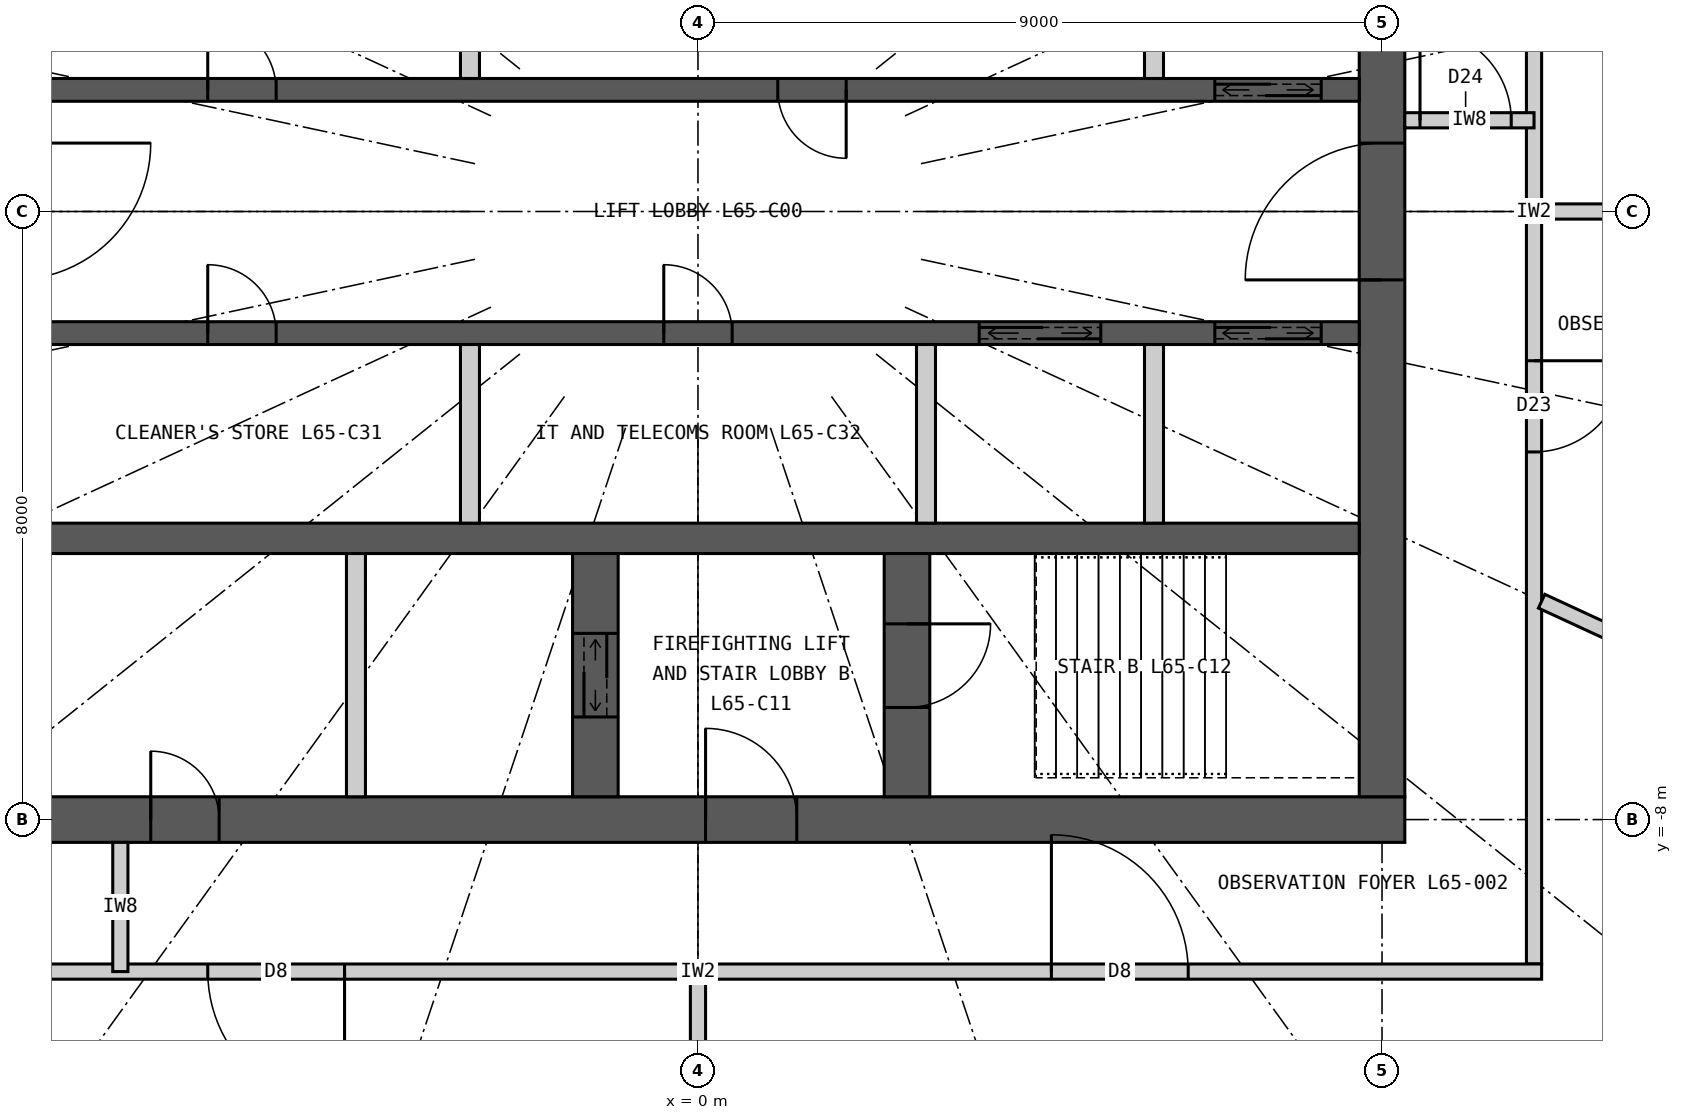
"""IFC4 building model, lengths in metres.
Left out: names, types, materials, properties, quantities, classifications, styles, units other than length and angle.
Written with IfcOpenShell. Run it as: python <this file> out.ifc"""

import sys

from ifc_helpers import new_model, si_unit, direction, frame, frame_2d, origin, place, context, subcontext, project, spatial, rectangle, extrude, element, fill, save


model = new_model("IFC4")
c1 = context("Model", 3, precision=1e-05, world=origin(), true_north=direction((0.0, 1.0)))
c2 = subcontext(c1, "Body", "Model", "MODEL_VIEW")
j1 = project(units=[si_unit("LENGTHUNIT", "METRE"), si_unit("PLANEANGLEUNIT", "RADIAN")], contexts=[c1])
p1 = place(None, origin())
s1 = spatial("IfcSite", under=j1, at=p1, CompositionType="ELEMENT")
p2 = place(p1, origin())
s2 = spatial("IfcBuilding", under=s1, at=p2, CompositionType="ELEMENT")
p3 = place(p2, frame((0.0, 0.0, 242.7)))
s3 = spatial("IfcBuildingStorey", under=s2, at=p3, CompositionType="ELEMENT", Elevation=242.7)
p4 = place(p3, frame((9.3, -8.0, 0.0), z_axis=(0.0, 0.0, 1.0), x_axis=(-1.0, 0.0, 0.0)))
e1 = element("IfcWall", 1, at=p4, inside=s3, PredefinedType="SHEAR", context=c2, shape_type="SweptSolid", body=[
    extrude(rectangle(XDim=18.6, YDim=0.6, at=frame_2d((9.3, 0.0))), origin(), (0.0, 0.0, 1.0), 6.0),
])
p5 = place(p4, frame((8.0, 0.0, 0.0)))
e2 = element("IfcOpeningElement", 2, at=p5, cuts=e1, PredefinedType="OPENING", context=c2, shape_type="SweptSolid", body=[
    extrude(rectangle(XDim=1.2, YDim=2.2, at=frame_2d((0.6, 1.1))), frame((0.0, 0.31, 0.0), z_axis=(0.0, -1.0, 0.0), x_axis=(1.0, 0.0, 0.0)), (0.0, 0.0, 1.0), 0.62),
])
p6 = place(p4, frame((15.6, 0.0, 0.0)))
e3 = element("IfcOpeningElement", 3, at=p6, cuts=e1, PredefinedType="OPENING", context=c2, shape_type="SweptSolid", body=[
    extrude(rectangle(XDim=0.9, YDim=2.2, at=frame_2d((0.45, 1.1))), frame((0.0, 0.31, 0.0), z_axis=(0.0, -1.0, 0.0), x_axis=(1.0, 0.0, 0.0)), (0.0, 0.0, 1.0), 0.62),
])
p7 = place(p3, frame((9.0, -7.7, 0.0), z_axis=(0.0, 0.0, 1.0), x_axis=(0.0, 1.0, 0.0)))
e4 = element("IfcWall", 4, at=p7, inside=s3, PredefinedType="SHEAR", context=c2, shape_type="SweptSolid", body=[
    extrude(rectangle(XDim=15.4, YDim=0.6, at=frame_2d((7.7, 0.0))), origin(), (0.0, 0.0, 1.0), 6.0),
])
p8 = place(p7, frame((6.8, 0.0, 0.0)))
e5 = element("IfcOpeningElement", 5, at=p8, cuts=e4, PredefinedType="OPENING", context=c2, shape_type="SweptSolid", body=[
    extrude(rectangle(XDim=1.8, YDim=2.2, at=frame_2d((0.9, 1.1))), frame((0.0, 0.31, 0.0), z_axis=(0.0, -1.0, 0.0), x_axis=(1.0, 0.0, 0.0)), (0.0, 0.0, 1.0), 0.62),
])
p9 = place(p3, frame((-8.7, 1.6, 0.0), z_axis=(0.0, 0.0, 1.0), x_axis=(1.0, 0.0, 0.0)))
e6 = element("IfcWall", 6, at=p9, inside=s3, PredefinedType="SHEAR", context=c2, shape_type="SweptSolid", body=[
    extrude(rectangle(XDim=17.4, YDim=0.3, at=frame_2d((8.7, 0.0))), origin(), (0.0, 0.0, 1.0), 6.0),
])
p10 = place(p9, frame((15.5, 0.0, 0.0)))
e7 = element("IfcOpeningElement", 7, at=p10, cuts=e6, PredefinedType="OPENING", context=c2, shape_type="SweptSolid", body=[
    extrude(rectangle(XDim=1.4, YDim=2.4, at=frame_2d((0.7, 1.2))), frame((0.0, 0.16, 0.0), z_axis=(0.0, -1.0, 0.0), x_axis=(1.0, 0.0, 0.0)), (0.0, 0.0, 1.0), 0.32),
])
p11 = place(p9, frame((2.25, 0.0, 0.0)))
e8 = element("IfcOpeningElement", 8, at=p11, cuts=e6, PredefinedType="OPENING", context=c2, shape_type="SweptSolid", body=[
    extrude(rectangle(XDim=0.9, YDim=2.2, at=frame_2d((0.45, 1.1))), frame((0.0, 0.16, 0.0), z_axis=(0.0, -1.0, 0.0), x_axis=(1.0, 0.0, 0.0)), (0.0, 0.0, 1.0), 0.32),
])
p12 = place(p9, frame((9.75, 0.0, 0.0)))
e9 = element("IfcOpeningElement", 9, at=p12, cuts=e6, PredefinedType="OPENING", context=c2, shape_type="SweptSolid", body=[
    extrude(rectangle(XDim=0.9, YDim=2.2, at=frame_2d((0.45, 1.1))), frame((0.0, 0.16, 0.0), z_axis=(0.0, -1.0, 0.0), x_axis=(1.0, 0.0, 0.0)), (0.0, 0.0, 1.0), 0.32),
])
p13 = place(p3, frame((-8.7, -4.3, 0.0), z_axis=(0.0, 0.0, 1.0), x_axis=(1.0, 0.0, 0.0)))
e10 = element("IfcWall", 10, at=p13, inside=s3, PredefinedType="SHEAR", context=c2, shape_type="SweptSolid", body=[
    extrude(rectangle(XDim=17.4, YDim=0.4, at=frame_2d((8.7, 0.0))), origin(), (0.0, 0.0, 1.0), 6.0),
])
p14 = place(p3, frame((-8.7, -1.6, 0.0), z_axis=(0.0, 0.0, 1.0), x_axis=(1.0, 0.0, 0.0)))
e11 = element("IfcWall", 11, at=p14, inside=s3, PredefinedType="SHEAR", context=c2, shape_type="SweptSolid", body=[
    extrude(rectangle(XDim=17.4, YDim=0.3, at=frame_2d((8.7, 0.0))), origin(), (0.0, 0.0, 1.0), 6.0),
])
p15 = place(p14, frame((12.4, 0.0, 0.0)))
e12 = element("IfcOpeningElement", 12, at=p15, cuts=e11, PredefinedType="OPENING", context=c2, shape_type="SweptSolid", body=[
    extrude(rectangle(XDim=1.6, YDim=2.4, at=frame_2d((0.8, 1.2))), frame((0.0, 0.16, 0.0), z_axis=(0.0, -1.0, 0.0), x_axis=(1.0, 0.0, 0.0)), (0.0, 0.0, 1.0), 0.32),
])
p16 = place(p14, frame((15.5, 0.0, 0.0)))
e13 = element("IfcOpeningElement", 13, at=p16, cuts=e11, PredefinedType="OPENING", context=c2, shape_type="SweptSolid", body=[
    extrude(rectangle(XDim=1.4, YDim=2.4, at=frame_2d((0.7, 1.2))), frame((0.0, 0.16, 0.0), z_axis=(0.0, -1.0, 0.0), x_axis=(1.0, 0.0, 0.0)), (0.0, 0.0, 1.0), 0.32),
])
p17 = place(p14, frame((2.25, 0.0, 0.0)))
e14 = element("IfcOpeningElement", 14, at=p17, cuts=e11, PredefinedType="OPENING", context=c2, shape_type="SweptSolid", body=[
    extrude(rectangle(XDim=0.9, YDim=2.2, at=frame_2d((0.45, 1.1))), frame((0.0, 0.16, 0.0), z_axis=(0.0, -1.0, 0.0), x_axis=(1.0, 0.0, 0.0)), (0.0, 0.0, 1.0), 0.32),
])
p18 = place(p14, frame((8.25, 0.0, 0.0)))
e15 = element("IfcOpeningElement", 15, at=p18, cuts=e11, PredefinedType="OPENING", context=c2, shape_type="SweptSolid", body=[
    extrude(rectangle(XDim=0.9, YDim=2.2, at=frame_2d((0.45, 1.1))), frame((0.0, 0.16, 0.0), z_axis=(0.0, -1.0, 0.0), x_axis=(1.0, 0.0, 0.0)), (0.0, 0.0, 1.0), 0.32),
])
p19 = place(p3, frame((2.75, -7.7, 0.0), z_axis=(0.0, 0.0, 1.0), x_axis=(0.0, 1.0, 0.0)))
e16 = element("IfcWall", 16, at=p19, inside=s3, PredefinedType="SHEAR", context=c2, shape_type="SweptSolid", body=[
    extrude(rectangle(XDim=3.2, YDim=0.6, at=frame_2d((1.6, 0.0))), origin(), (0.0, 0.0, 1.0), 6.0),
])
p20 = place(p19, frame((1.175, 0.0, 0.0)))
e17 = element("IfcOpeningElement", 17, at=p20, cuts=e16, PredefinedType="OPENING", context=c2, shape_type="SweptSolid", body=[
    extrude(rectangle(XDim=1.1, YDim=2.2, at=frame_2d((0.55, 1.1))), frame((0.0, 0.31, 0.0), z_axis=(0.0, -1.0, 0.0), x_axis=(1.0, 0.0, 0.0)), (0.0, 0.0, 1.0), 0.62),
])
p21 = place(p3, frame((-1.35, -7.7, 0.0), z_axis=(0.0, 0.0, 1.0), x_axis=(0.0, 1.0, 0.0)))
e18 = element("IfcWall", 18, at=p21, inside=s3, PredefinedType="SHEAR", context=c2, shape_type="SweptSolid", body=[
    extrude(rectangle(XDim=3.2, YDim=0.6, at=frame_2d((1.6, 0.0))), origin(), (0.0, 0.0, 1.0), 6.0),
])
p22 = place(p21, frame((1.05, 0.0, 0.0)))
e19 = element("IfcOpeningElement", 19, at=p22, cuts=e18, PredefinedType="OPENING", context=c2, shape_type="SweptSolid", body=[
    extrude(rectangle(XDim=1.1, YDim=2.2, at=frame_2d((0.55, 1.1))), frame((0.0, 0.31, 0.0), z_axis=(0.0, -1.0, 0.0), x_axis=(1.0, 0.0, 0.0)), (0.0, 0.0, 1.0), 0.62),
])
p23 = place(p3, frame((-4.5, -7.7, 0.0), z_axis=(0.0, 0.0, 1.0), x_axis=(0.0, 1.0, 0.0)))
e20 = element("IfcWall", 20, at=p23, inside=s3, PredefinedType="PARTITIONING", context=c2, shape_type="SweptSolid", body=[
    extrude(rectangle(XDim=3.2, YDim=0.25, at=frame_2d((1.6, 0.0))), origin(), (0.0, 0.0, 1.0), 6.0),
])
for number, where, z_axis, x_axis in (
    (21, (-3.0, 1.75, 0.0), (0.0, 0.0, 1.0), (0.0, 1.0, 0.0)),
    (22, (6.0, 1.75, 0.0), (0.0, 0.0, 1.0), (0.0, 1.0, 0.0)),
    (23, (-3.0, -4.1, 0.0), (0.0, 0.0, 1.0), (0.0, 1.0, 0.0)),
    (24, (3.0, -4.1, 0.0), (0.0, 0.0, 1.0), (0.0, 1.0, 0.0)),
    (25, (6.0, -4.1, 0.0), (0.0, 0.0, 1.0), (0.0, 1.0, 0.0)),
):
    element("IfcWall", number, at=place(p3, frame(where, z_axis=z_axis, x_axis=x_axis)), inside=s3, PredefinedType="PARTITIONING", context=c2, shape_type="SweptSolid", body=[
        extrude(rectangle(XDim=2.35, YDim=0.25, at=frame_2d((1.175, 0.0))), origin(), (0.0, 0.0, 1.0), 6.0),
    ])
p24 = place(p3, frame((9.346, -12.951, 0.0), z_axis=(0.0, 0.0, 1.0), x_axis=(0.858849230109, 0.512228464594, 0.0)))
e26 = element("IfcWall", 26, at=p24, inside=s3, PredefinedType="ELEMENTEDWALL", context=c2, shape_type="SweptSolid", body=[
    extrude(rectangle(XDim=4.564, YDim=0.15, at=frame_2d((2.282, 0.0))), origin(), (0.0, 0.0, 1.0), 5.7),
])
p25 = place(p24, frame((0.782, 0.0, 0.5)))
e27 = element("IfcOpeningElement", 27, at=p25, cuts=e26, PredefinedType="OPENING", context=c2, shape_type="SweptSolid", body=[
    extrude(rectangle(XDim=1.2, YDim=4.2, at=frame_2d((0.6, 2.1))), frame((0.0, 0.085, 0.0), z_axis=(0.0, -1.0, 0.0), x_axis=(1.0, 0.0, 0.0)), (0.0, 0.0, 1.0), 0.17),
])
p26 = place(p24, frame((2.582, 0.0, 0.5)))
e28 = element("IfcOpeningElement", 28, at=p26, cuts=e26, PredefinedType="OPENING", context=c2, shape_type="SweptSolid", body=[
    extrude(rectangle(XDim=1.2, YDim=4.2, at=frame_2d((0.6, 2.1))), frame((0.0, 0.085, 0.0), z_axis=(0.0, -1.0, 0.0), x_axis=(1.0, 0.0, 0.0)), (0.0, 0.0, 1.0), 0.17),
])
p27 = place(p3, frame((11.0, -9.9, 0.0), z_axis=(0.0, 0.0, 1.0), x_axis=(0.0, 1.0, 0.0)))
e29 = element("IfcWall", 29, at=p27, inside=s3, PredefinedType="PARTITIONING", context=c2, shape_type="SweptSolid", body=[
    extrude(rectangle(XDim=19.8, YDim=0.2, at=frame_2d((9.9, 0.0))), origin(), (0.0, 0.0, 1.0), 5.7),
])
p28 = place(p27, frame((6.737, 0.0, 0.0)))
e30 = element("IfcOpeningElement", 30, at=p28, cuts=e29, PredefinedType="OPENING", context=c2, shape_type="SweptSolid", body=[
    extrude(rectangle(XDim=1.2, YDim=2.2, at=frame_2d((0.6, 1.1))), frame((0.0, 0.11, 0.0), z_axis=(0.0, -1.0, 0.0), x_axis=(1.0, 0.0, 0.0)), (0.0, 0.0, 1.0), 0.22),
])
p29 = place(p3, frame((11.1, -10.0, 0.0), z_axis=(0.0, 0.0, 1.0), x_axis=(-1.0, 0.0, 0.0)))
e31 = element("IfcWall", 31, at=p29, inside=s3, PredefinedType="PARTITIONING", context=c2, shape_type="SweptSolid", body=[
    extrude(rectangle(XDim=22.2, YDim=0.2, at=frame_2d((11.1, 0.0))), origin(), (0.0, 0.0, 1.0), 5.7),
])
p30 = place(p29, frame((4.65, 0.0, 0.0)))
e32 = element("IfcOpeningElement", 32, at=p30, cuts=e31, PredefinedType="OPENING", context=c2, shape_type="SweptSolid", body=[
    extrude(rectangle(XDim=1.8, YDim=2.4, at=frame_2d((0.9, 1.2))), frame((0.0, 0.11, 0.0), z_axis=(0.0, -1.0, 0.0), x_axis=(1.0, 0.0, 0.0)), (0.0, 0.0, 1.0), 0.22),
])
p31 = place(p29, frame((15.75, 0.0, 0.0)))
e33 = element("IfcOpeningElement", 33, at=p31, cuts=e31, PredefinedType="OPENING", context=c2, shape_type="SweptSolid", body=[
    extrude(rectangle(XDim=1.8, YDim=2.4, at=frame_2d((0.9, 1.2))), frame((0.0, 0.11, 0.0), z_axis=(0.0, -1.0, 0.0), x_axis=(1.0, 0.0, 0.0)), (0.0, 0.0, 1.0), 0.22),
])
p32 = place(p3, frame((11.1, 0.0, 0.0), z_axis=(0.0, 0.0, 1.0), x_axis=(1.0, 0.0, 0.0)))
e34 = element("IfcWall", 34, at=p32, inside=s3, PredefinedType="PARTITIONING", context=c2, shape_type="SweptSolid", body=[
    extrude(rectangle(XDim=6.9, YDim=0.2, at=frame_2d((3.45, 0.0))), origin(), (0.0, 0.0, 1.0), 4.85),
])
p33 = place(p3, frame((0.0, -10.1, 0.0), z_axis=(0.0, 0.0, 1.0), x_axis=(0.0, -1.0, 0.0)))
e35 = element("IfcWall", 35, at=p33, inside=s3, PredefinedType="PARTITIONING", context=c2, shape_type="SweptSolid", body=[
    extrude(rectangle(XDim=3.9, YDim=0.2, at=frame_2d((1.95, 0.0))), origin(), (0.0, 0.0, 1.0), 4.85),
])
p34 = place(p3, frame((11.1, -5.127, 0.0), z_axis=(0.0, 0.0, 1.0), x_axis=(0.90783501602, -0.41932753748, 0.0)))
e36 = element("IfcWall", 36, at=p34, inside=s3, PredefinedType="PARTITIONING", context=c2, shape_type="SweptSolid", body=[
    extrude(rectangle(XDim=4.828, YDim=0.2, at=frame_2d((2.414, 0.0))), origin(), (0.0, 0.0, 1.0), 4.8),
])
p35 = place(p3, frame((-7.6, -8.3, 0.0), z_axis=(0.0, 0.0, 1.0), x_axis=(0.0, -1.0, 0.0)))
e37 = element("IfcWall", 37, at=p35, inside=s3, PredefinedType="PARTITIONING", context=c2, shape_type="SweptSolid", body=[
    extrude(rectangle(XDim=1.7, YDim=0.2, at=frame_2d((0.85, 0.0))), origin(), (0.0, 0.0, 1.0), 5.7),
])
p36 = place(p3, frame((9.3, 1.2, 0.0), z_axis=(0.0, 0.0, 1.0), x_axis=(1.0, 0.0, 0.0)))
e38 = element("IfcWall", 38, at=p36, inside=s3, PredefinedType="PARTITIONING", context=c2, shape_type="SweptSolid", body=[
    extrude(rectangle(XDim=1.7, YDim=0.2, at=frame_2d((0.85, 0.0))), origin(), (0.0, 0.0, 1.0), 5.7),
])
p37 = place(p36, frame((0.2, 0.0, 0.0)))
e39 = element("IfcOpeningElement", 39, at=p37, cuts=e38, PredefinedType="OPENING", context=c2, shape_type="SweptSolid", body=[
    extrude(rectangle(XDim=1.2, YDim=2.2, at=frame_2d((0.6, 1.1))), frame((0.0, 0.11, 0.0), z_axis=(0.0, -1.0, 0.0), x_axis=(1.0, 0.0, 0.0)), (0.0, 0.0, 1.0), 0.22),
])
p38 = place(p30, origin())
e40 = element("IfcDoor", 40, at=p38, inside=s3, OperationType="DOUBLE_DOOR_DOUBLE_SWING", PredefinedType="DOOR", context=c2, shape_type="SweptSolid", body=[
    extrude(rectangle(XDim=1.8, YDim=2.4, at=frame_2d((0.9, 1.2))), frame((0.0, 0.025, 0.0), z_axis=(0.0, -1.0, 0.0), x_axis=(1.0, 0.0, 0.0)), (0.0, 0.0, 1.0), 0.05),
])
fill(e32, e40)
p39 = place(p31, origin())
e41 = element("IfcDoor", 41, at=p39, inside=s3, OperationType="DOUBLE_DOOR_DOUBLE_SWING", PredefinedType="DOOR", context=c2, shape_type="SweptSolid", body=[
    extrude(rectangle(XDim=1.8, YDim=2.4, at=frame_2d((0.9, 1.2))), frame((0.0, 0.025, 0.0), z_axis=(0.0, -1.0, 0.0), x_axis=(1.0, 0.0, 0.0)), (0.0, 0.0, 1.0), 0.05),
])
fill(e33, e41)
p40 = place(p28, origin())
e42 = element("IfcDoor", 42, at=p40, inside=s3, OperationType="SINGLE_SWING_RIGHT", PredefinedType="DOOR", context=c2, shape_type="SweptSolid", body=[
    extrude(rectangle(XDim=1.2, YDim=2.2, at=frame_2d((0.6, 1.1))), frame((0.0, 0.025, 0.0), z_axis=(0.0, -1.0, 0.0), x_axis=(1.0, 0.0, 0.0)), (0.0, 0.0, 1.0), 0.05),
])
fill(e30, e42)
p41 = place(p37, origin())
e43 = element("IfcDoor", 43, at=p41, inside=s3, OperationType="SINGLE_SWING_LEFT", PredefinedType="DOOR", context=c2, shape_type="SweptSolid", body=[
    extrude(rectangle(XDim=1.2, YDim=2.2, at=frame_2d((0.6, 1.1))), frame((0.0, 0.025, 0.0), z_axis=(0.0, -1.0, 0.0), x_axis=(1.0, 0.0, 0.0)), (0.0, 0.0, 1.0), 0.05),
])
fill(e39, e43)
p42 = place(p5, origin())
e44 = element("IfcDoor", 44, at=p42, inside=s3, OperationType="SINGLE_SWING_RIGHT", PredefinedType="DOOR", context=c2, shape_type="SweptSolid", body=[
    extrude(rectangle(XDim=1.2, YDim=2.2, at=frame_2d((0.6, 1.1))), frame((0.0, 0.025, 0.0), z_axis=(0.0, -1.0, 0.0), x_axis=(1.0, 0.0, 0.0)), (0.0, 0.0, 1.0), 0.05),
])
fill(e2, e44)
p43 = place(p20, origin())
e45 = element("IfcDoor", 45, at=p43, inside=s3, OperationType="SINGLE_SWING_RIGHT", PredefinedType="DOOR", context=c2, shape_type="SweptSolid", body=[
    extrude(rectangle(XDim=1.1, YDim=2.2, at=frame_2d((0.55, 1.1))), frame((0.0, 0.025, 0.0), z_axis=(0.0, -1.0, 0.0), x_axis=(1.0, 0.0, 0.0)), (0.0, 0.0, 1.0), 0.05),
])
fill(e17, e45)
p44 = place(p22, origin())
e46 = element("IfcDoor", 46, at=p44, inside=s3, OperationType="DOUBLE_DOOR_SLIDING", PredefinedType="DOOR", context=c2, shape_type="SweptSolid", body=[
    extrude(rectangle(XDim=1.1, YDim=2.2, at=frame_2d((0.55, 1.1))), frame((0.0, 0.025, 0.0), z_axis=(0.0, -1.0, 0.0), x_axis=(1.0, 0.0, 0.0)), (0.0, 0.0, 1.0), 0.05),
])
fill(e19, e46)
p45 = place(p6, origin())
e47 = element("IfcDoor", 47, at=p45, inside=s3, OperationType="SINGLE_SWING_RIGHT", PredefinedType="DOOR", context=c2, shape_type="SweptSolid", body=[
    extrude(rectangle(XDim=0.9, YDim=2.2, at=frame_2d((0.45, 1.1))), frame((0.0, 0.025, 0.0), z_axis=(0.0, -1.0, 0.0), x_axis=(1.0, 0.0, 0.0)), (0.0, 0.0, 1.0), 0.05),
])
fill(e3, e47)
p46 = place(p10, origin())
e48 = element("IfcDoor", 48, at=p46, inside=s3, OperationType="DOUBLE_DOOR_SLIDING", PredefinedType="DOOR", context=c2, shape_type="SweptSolid", body=[
    extrude(rectangle(XDim=1.4, YDim=2.4, at=frame_2d((0.7, 1.2))), frame((0.0, 0.025, 0.0), z_axis=(0.0, -1.0, 0.0), x_axis=(1.0, 0.0, 0.0)), (0.0, 0.0, 1.0), 0.05),
])
fill(e7, e48)
p47 = place(p15, origin())
e49 = element("IfcDoor", 49, at=p47, inside=s3, OperationType="DOUBLE_DOOR_SLIDING", PredefinedType="DOOR", context=c2, shape_type="SweptSolid", body=[
    extrude(rectangle(XDim=1.6, YDim=2.4, at=frame_2d((0.8, 1.2))), frame((0.0, 0.025, 0.0), z_axis=(0.0, -1.0, 0.0), x_axis=(1.0, 0.0, 0.0)), (0.0, 0.0, 1.0), 0.05),
])
fill(e12, e49)
p48 = place(p16, origin())
e50 = element("IfcDoor", 50, at=p48, inside=s3, OperationType="DOUBLE_DOOR_SLIDING", PredefinedType="DOOR", context=c2, shape_type="SweptSolid", body=[
    extrude(rectangle(XDim=1.4, YDim=2.4, at=frame_2d((0.7, 1.2))), frame((0.0, 0.025, 0.0), z_axis=(0.0, -1.0, 0.0), x_axis=(1.0, 0.0, 0.0)), (0.0, 0.0, 1.0), 0.05),
])
fill(e13, e50)
p49 = place(p11, origin())
e51 = element("IfcDoor", 51, at=p49, inside=s3, OperationType="SINGLE_SWING_LEFT", PredefinedType="DOOR", context=c2, shape_type="SweptSolid", body=[
    extrude(rectangle(XDim=0.9, YDim=2.2, at=frame_2d((0.45, 1.1))), frame((0.0, 0.025, 0.0), z_axis=(0.0, -1.0, 0.0), x_axis=(1.0, 0.0, 0.0)), (0.0, 0.0, 1.0), 0.05),
])
fill(e8, e51)
p50 = place(p12, origin())
e52 = element("IfcDoor", 52, at=p50, inside=s3, OperationType="SINGLE_SWING_RIGHT", PredefinedType="DOOR", context=c2, shape_type="SweptSolid", body=[
    extrude(rectangle(XDim=0.9, YDim=2.2, at=frame_2d((0.45, 1.1))), frame((0.0, 0.025, 0.0), z_axis=(0.0, -1.0, 0.0), x_axis=(1.0, 0.0, 0.0)), (0.0, 0.0, 1.0), 0.05),
])
fill(e9, e52)
p51 = place(p17, origin())
e53 = element("IfcDoor", 53, at=p51, inside=s3, OperationType="SINGLE_SWING_LEFT", PredefinedType="DOOR", context=c2, shape_type="SweptSolid", body=[
    extrude(rectangle(XDim=0.9, YDim=2.2, at=frame_2d((0.45, 1.1))), frame((0.0, 0.025, 0.0), z_axis=(0.0, -1.0, 0.0), x_axis=(1.0, 0.0, 0.0)), (0.0, 0.0, 1.0), 0.05),
])
fill(e14, e53)
p52 = place(p18, origin())
e54 = element("IfcDoor", 54, at=p52, inside=s3, OperationType="SINGLE_SWING_LEFT", PredefinedType="DOOR", context=c2, shape_type="SweptSolid", body=[
    extrude(rectangle(XDim=0.9, YDim=2.2, at=frame_2d((0.45, 1.1))), frame((0.0, 0.025, 0.0), z_axis=(0.0, -1.0, 0.0), x_axis=(1.0, 0.0, 0.0)), (0.0, 0.0, 1.0), 0.05),
])
fill(e15, e54)
p53 = place(p8, origin())
e55 = element("IfcDoor", 55, at=p53, inside=s3, OperationType="DOUBLE_DOOR_DOUBLE_SWING", PredefinedType="DOOR", context=c2, shape_type="SweptSolid", body=[
    extrude(rectangle(XDim=1.8, YDim=2.2, at=frame_2d((0.9, 1.1))), frame((0.0, 0.025, 0.0), z_axis=(0.0, -1.0, 0.0), x_axis=(1.0, 0.0, 0.0)), (0.0, 0.0, 1.0), 0.05),
])
fill(e5, e55)
save(model, sys.argv[1])
